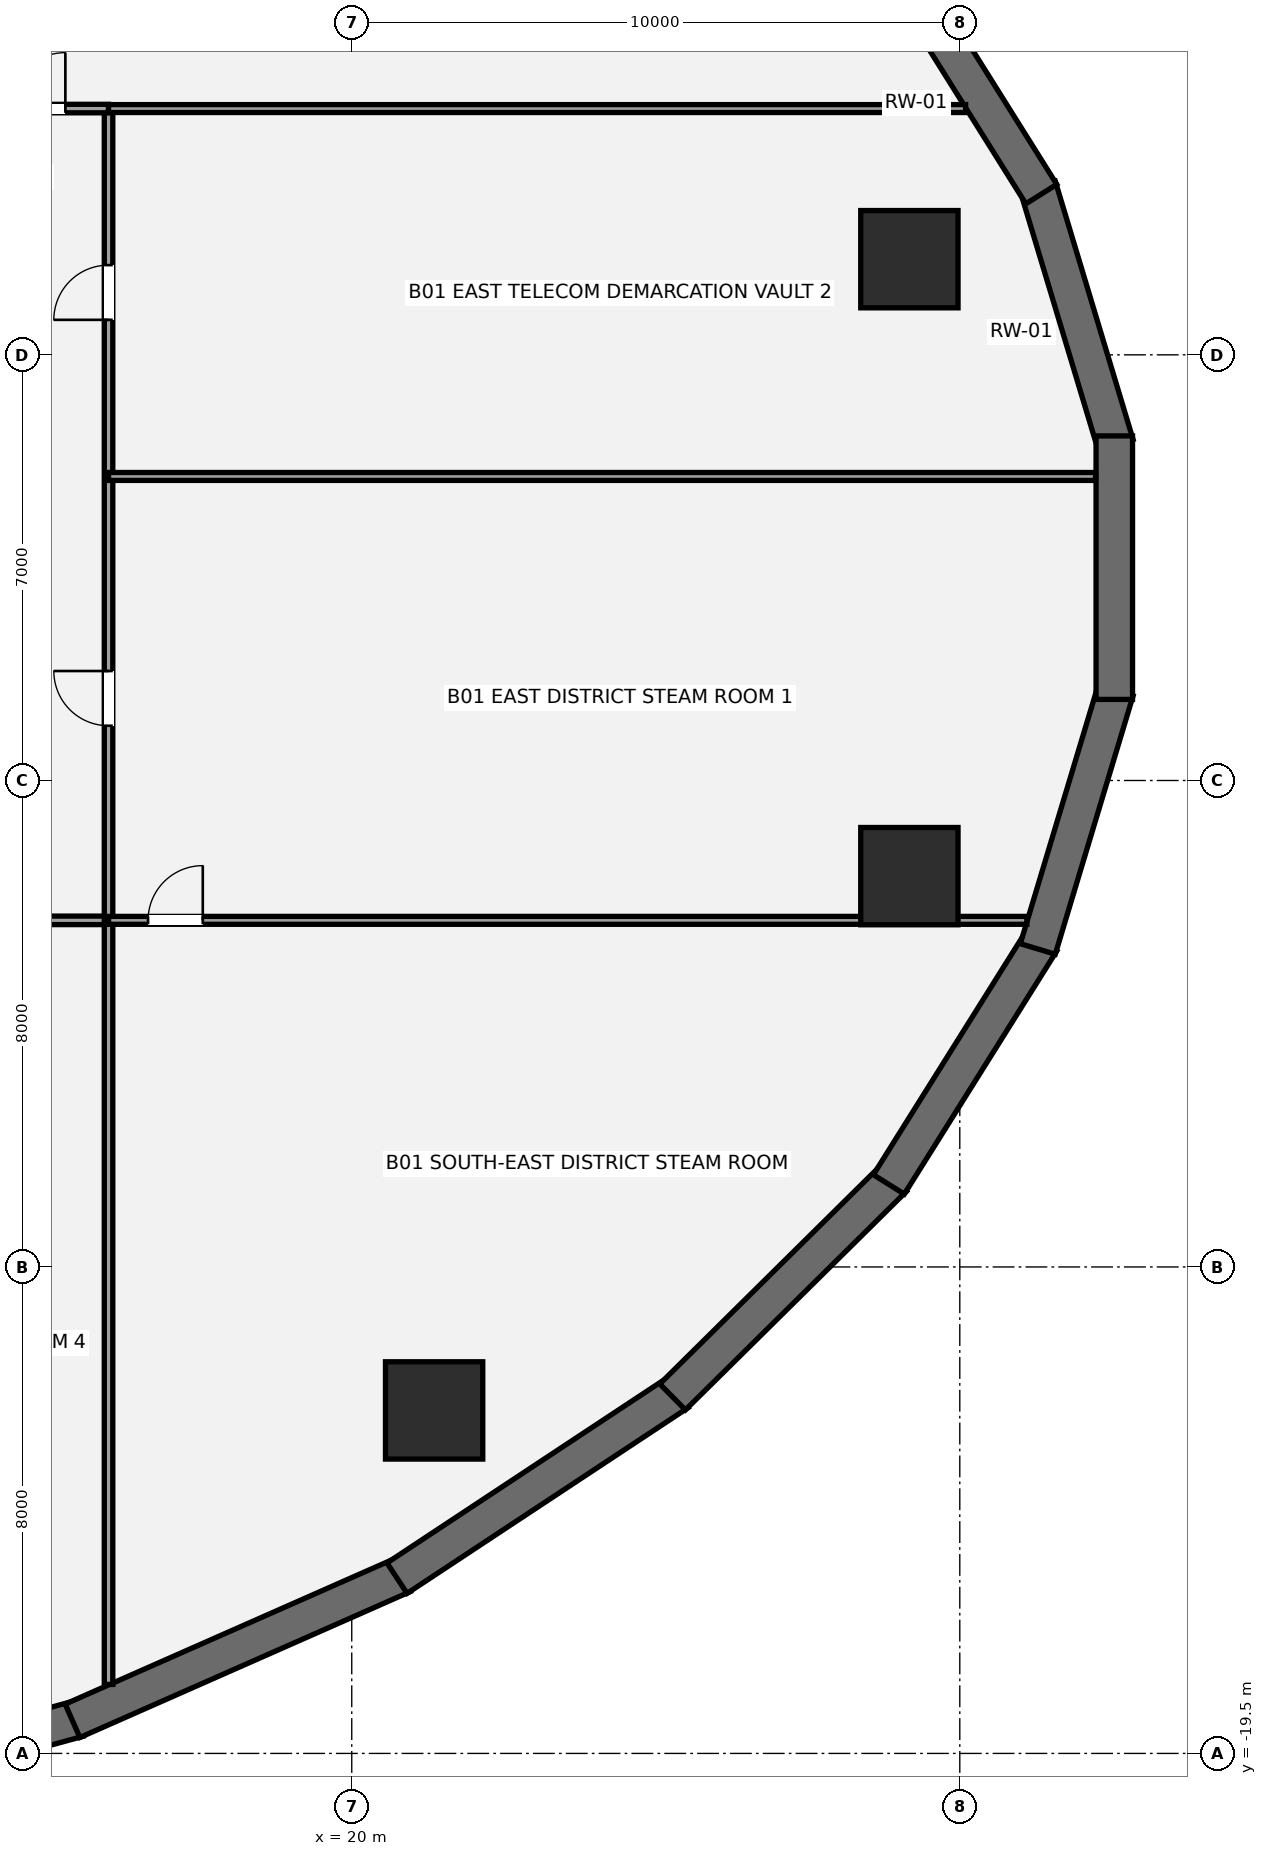
"""IFC4 building model, lengths in metres.
Left out: names, types, materials, properties, quantities, classifications, styles, units other than length and angle.
Written with IfcOpenShell. Run it as: python <this file> out.ifc"""

import sys

from ifc_helpers import new_model, si_unit, direction, frame, frame_2d, origin, origin_2d, place, context, subcontext, project, spatial, rectangle, hollow_circle, extrude, element, fill, save


model = new_model("IFC4")
c1 = context("Model", 3, precision=1e-05, world=origin(), true_north=direction((0.0, 1.0)))
c2 = subcontext(c1, "Body", "Model", "MODEL_VIEW")
j1 = project(units=[si_unit("LENGTHUNIT", "METRE"), si_unit("PLANEANGLEUNIT", "RADIAN")], contexts=[c1])
p1 = place(None, origin())
s1 = spatial("IfcSite", under=j1, at=p1, CompositionType="ELEMENT")
p2 = place(p1, origin())
s2 = spatial("IfcBuilding", under=s1, at=p2, CompositionType="ELEMENT")
p3 = place(p2, frame((0.0, 0.0, -4.4)))
s3 = spatial("IfcBuildingStorey", under=s2, at=p3, CompositionType="ELEMENT", Elevation=-4.4)
p4 = place(p3, frame((32.562, 2.021, 0.0), z_axis=(0.0, 0.0, 1.0), x_axis=(-0.288296686647, 0.95754113252, 0.0)))
e1 = element("IfcWall", 1, at=p4, inside=s3, PredefinedType="USERDEFINED", context=c2, shape_type="SweptSolid", body=[
    extrude(rectangle(XDim=4.438, YDim=0.6, at=frame_2d((2.219, 0.0))), origin(), (0.0, 0.0, 1.0), 4.4),
])
p5 = place(p3, frame((31.341, 6.143, 0.0), z_axis=(0.0, 0.0, 1.0), x_axis=(-0.531244363113, 0.847218641592, 0.0)))
e2 = element("IfcWall", 2, at=p5, inside=s3, PredefinedType="USERDEFINED", context=c2, shape_type="SweptSolid", body=[
    extrude(rectangle(XDim=4.72, YDim=0.6, at=frame_2d((2.36, 0.0))), origin(), (0.0, 0.0, 1.0), 4.4),
])
p6 = place(p3, frame((9.471, -20.58, 0.0), z_axis=(0.0, 0.0, 1.0), x_axis=(0.964548276597, 0.263906464707, 0.0)))
e3 = element("IfcWall", 3, at=p6, inside=s3, PredefinedType="USERDEFINED", context=c2, shape_type="SweptSolid", body=[
    extrude(rectangle(XDim=6.257, YDim=0.6, at=frame_2d((3.128, 0.0))), origin(), (0.0, 0.0, 1.0), 4.4),
])
p7 = place(p3, frame((15.407, -18.964, 0.0), z_axis=(0.0, 0.0, 1.0), x_axis=(0.91483072277, 0.403837527574, 0.0)))
e4 = element("IfcWall", 4, at=p7, inside=s3, PredefinedType="USERDEFINED", context=c2, shape_type="SweptSolid", body=[
    extrude(rectangle(XDim=5.94, YDim=0.6, at=frame_2d((2.97, 0.0))), origin(), (0.0, 0.0, 1.0), 4.4),
])
p8 = place(p3, frame((20.745, -16.618, 0.0), z_axis=(0.0, 0.0, 1.0), x_axis=(0.834367518908, 0.551208529861, 0.0)))
e5 = element("IfcWall", 5, at=p8, inside=s3, PredefinedType="USERDEFINED", context=c2, shape_type="SweptSolid", body=[
    extrude(rectangle(XDim=5.542, YDim=0.6, at=frame_2d((2.771, 0.0))), origin(), (0.0, 0.0, 1.0), 4.4),
])
p9 = place(p3, frame((25.277, -13.638, 0.0), z_axis=(0.0, 0.0, 1.0), x_axis=(0.711105403666, 0.70308541791, 0.0)))
e6 = element("IfcWall", 6, at=p9, inside=s3, PredefinedType="USERDEFINED", context=c2, shape_type="SweptSolid", body=[
    extrude(rectangle(XDim=5.114, YDim=0.6, at=frame_2d((2.557, 0.0))), origin(), (0.0, 0.0, 1.0), 4.4),
])
p10 = place(p3, frame((28.833, -10.142, 0.0), z_axis=(0.0, 0.0, 1.0), x_axis=(0.531244363113, 0.847218641592, 0.0)))
e7 = element("IfcWall", 7, at=p10, inside=s3, PredefinedType="USERDEFINED", context=c2, shape_type="SweptSolid", body=[
    extrude(rectangle(XDim=4.72, YDim=0.6, at=frame_2d((2.36, 0.0))), origin(), (0.0, 0.0, 1.0), 4.4),
])
p11 = place(p3, frame((31.283, -6.271, 0.0), z_axis=(0.0, 0.0, 1.0), x_axis=(0.288296686647, 0.95754113252, 0.0)))
e8 = element("IfcWall", 8, at=p11, inside=s3, PredefinedType="USERDEFINED", context=c2, shape_type="SweptSolid", body=[
    extrude(rectangle(XDim=4.438, YDim=0.6, at=frame_2d((2.219, 0.0))), origin(), (0.0, 0.0, 1.0), 4.4),
])
p12 = place(p3, frame((32.541, -2.167, 0.0), z_axis=(0.0, 0.0, 1.0), x_axis=(0.0, 1.0, 0.0)))
e9 = element("IfcWall", 9, at=p12, inside=s3, PredefinedType="USERDEFINED", context=c2, shape_type="SweptSolid", body=[
    extrude(rectangle(XDim=4.333, YDim=0.6, at=frame_2d((2.167, 0.0))), origin(), (0.0, 0.0, 1.0), 4.4),
])
for number, where, z_axis, x_axis in (
    (10, (29.171, 5.073, 0.0), (0.0, 0.0, 1.0), (1.0, 0.0, 0.0)),
    (11, (21.354, -13.859, 0.0), (0.0, 0.0, 1.0), (1.0, 0.0, 0.0)),
    (12, (29.171, -5.073, 0.0), (0.0, 0.0, 1.0), (1.0, 0.0, 0.0)),
):
    element("IfcColumn", number, at=place(p3, frame(where, z_axis=z_axis, x_axis=x_axis)), inside=s3, PredefinedType="USERDEFINED", context=c2, shape_type="SweptSolid", body=[
        extrude(hollow_circle(Radius=0.8, WallThickness=0.06, at=origin_2d()), origin(), (0.0, 0.0, 1.0), 4.4),
    ])
p13 = place(p3, frame((-16.0, -5.8, 0.0), z_axis=(0.0, 0.0, 1.0), x_axis=(1.0, 0.0, 0.0)))
e13 = element("IfcWall", 13, at=p13, inside=s3, PredefinedType="PARTITIONING", context=c2, shape_type="SweptSolid", body=[
    extrude(rectangle(XDim=32.0, YDim=0.14, at=frame_2d((16.0, 0.0))), origin(), (0.0, 0.0, 1.0), 4.14),
])
p14 = place(p13, frame((3.05, 0.0, 0.0)))
e14 = element("IfcOpeningElement", 14, at=p14, cuts=e13, PredefinedType="OPENING", context=c2, shape_type="SweptSolid", body=[
    extrude(rectangle(XDim=0.9, YDim=2.1, at=frame_2d((0.45, 1.05))), frame((0.0, 0.08, 0.0), z_axis=(0.0, -1.0, 0.0), x_axis=(1.0, 0.0, 0.0)), (0.0, 0.0, 1.0), 0.16),
])
p15 = place(p13, frame((11.05, 0.0, 0.0)))
e15 = element("IfcOpeningElement", 15, at=p15, cuts=e13, PredefinedType="OPENING", context=c2, shape_type="SweptSolid", body=[
    extrude(rectangle(XDim=0.9, YDim=2.1, at=frame_2d((0.45, 1.05))), frame((0.0, 0.08, 0.0), z_axis=(0.0, -1.0, 0.0), x_axis=(1.0, 0.0, 0.0)), (0.0, 0.0, 1.0), 0.16),
])
p16 = place(p13, frame((20.05, 0.0, 0.0)))
e16 = element("IfcOpeningElement", 16, at=p16, cuts=e13, PredefinedType="OPENING", context=c2, shape_type="SweptSolid", body=[
    extrude(rectangle(XDim=0.9, YDim=2.1, at=frame_2d((0.45, 1.05))), frame((0.0, 0.08, 0.0), z_axis=(0.0, -1.0, 0.0), x_axis=(1.0, 0.0, 0.0)), (0.0, 0.0, 1.0), 0.16),
])
p17 = place(p13, frame((28.05, 0.0, 0.0)))
e17 = element("IfcOpeningElement", 17, at=p17, cuts=e13, PredefinedType="OPENING", context=c2, shape_type="SweptSolid", body=[
    extrude(rectangle(XDim=0.9, YDim=2.1, at=frame_2d((0.45, 1.05))), frame((0.0, 0.08, 0.0), z_axis=(0.0, -1.0, 0.0), x_axis=(1.0, 0.0, 0.0)), (0.0, 0.0, 1.0), 0.16),
])
p18 = place(p3, frame((16.0, -18.365, 0.0), z_axis=(0.0, 0.0, 1.0), x_axis=(0.0, 1.0, 0.0)))
e18 = element("IfcWall", 18, at=p18, inside=s3, PredefinedType="PARTITIONING", context=c2, shape_type="SweptSolid", body=[
    extrude(rectangle(XDim=25.916, YDim=0.14, at=frame_2d((12.958, 0.0))), origin(), (0.0, 0.0, 1.0), 3.508),
])
p19 = place(p18, frame((15.766, 0.0, 0.0)))
e19 = element("IfcOpeningElement", 19, at=p19, cuts=e18, PredefinedType="OPENING", context=c2, shape_type="SweptSolid", body=[
    extrude(rectangle(XDim=0.9, YDim=2.1, at=frame_2d((0.45, 1.05))), frame((0.0, 0.08, 0.0), z_axis=(0.0, -1.0, 0.0), x_axis=(1.0, 0.0, 0.0)), (0.0, 0.0, 1.0), 0.16),
])
p20 = place(p18, frame((22.441, 0.0, 0.0)))
e20 = element("IfcOpeningElement", 20, at=p20, cuts=e18, PredefinedType="OPENING", context=c2, shape_type="SweptSolid", body=[
    extrude(rectangle(XDim=0.9, YDim=2.1, at=frame_2d((0.45, 1.05))), frame((0.0, 0.08, 0.0), z_axis=(0.0, -1.0, 0.0), x_axis=(1.0, 0.0, 0.0)), (0.0, 0.0, 1.0), 0.16),
])
p21 = place(p3, frame((14.05, 7.55, 0.0), z_axis=(0.0, 0.0, 1.0), x_axis=(1.0, 0.0, 0.0)))
e21 = element("IfcWall", 21, at=p21, inside=s3, PredefinedType="PARTITIONING", context=c2, shape_type="SweptSolid", body=[
    extrude(rectangle(XDim=1.95, YDim=0.14, at=frame_2d((0.975, 0.0))), origin(), (0.0, 0.0, 1.0), 4.14),
])
p22 = place(p21, frame((0.32, 0.0, 0.0)))
e22 = element("IfcOpeningElement", 22, at=p22, cuts=e21, PredefinedType="OPENING", context=c2, shape_type="SweptSolid", body=[
    extrude(rectangle(XDim=0.92, YDim=2.15, at=frame_2d((0.46, 1.075))), frame((0.0, 0.08, 0.0), z_axis=(0.0, -1.0, 0.0), x_axis=(1.0, 0.0, 0.0)), (0.0, 0.0, 1.0), 0.16),
])
p23 = place(p3, frame((16.0, 7.55, 0.0), z_axis=(0.0, 0.0, 1.0), x_axis=(1.0, 0.0, 0.0)))
e23 = element("IfcWall", 23, at=p23, inside=s3, PredefinedType="PARTITIONING", context=c2, shape_type="SweptSolid", body=[
    extrude(rectangle(XDim=14.095, YDim=0.13, at=frame_2d((7.048, 0.0))), origin(), (0.0, 0.0, 1.0), 3.118),
])
p24 = place(p3, frame((16.0, -5.8, 0.0), z_axis=(0.0, 0.0, 1.0), x_axis=(1.0, 0.0, 0.0)))
e24 = element("IfcWall", 24, at=p24, inside=s3, PredefinedType="PARTITIONING", context=c2, shape_type="SweptSolid", body=[
    extrude(rectangle(XDim=15.103, YDim=0.13, at=frame_2d((7.552, 0.0))), origin(), (0.0, 0.0, 1.0), 3.118),
])
p25 = place(p24, frame((0.65, 0.0, 0.0)))
e25 = element("IfcOpeningElement", 25, at=p25, cuts=e24, PredefinedType="OPENING", context=c2, shape_type="SweptSolid", body=[
    extrude(rectangle(XDim=0.9, YDim=2.1, at=frame_2d((0.45, 1.05))), frame((0.0, 0.075, 0.0), z_axis=(0.0, -1.0, 0.0), x_axis=(1.0, 0.0, 0.0)), (0.0, 0.0, 1.0), 0.15),
])
p26 = place(p3, frame((16.0, 1.5, 0.0), z_axis=(0.0, 0.0, 1.0), x_axis=(1.0, 0.0, 0.0)))
e26 = element("IfcWall", 26, at=p26, inside=s3, PredefinedType="PARTITIONING", context=c2, shape_type="SweptSolid", body=[
    extrude(rectangle(XDim=16.233, YDim=0.13, at=frame_2d((8.117, 0.0))), origin(), (0.0, 0.0, 1.0), 4.14),
])
p27 = place(p22, origin())
e27 = element("IfcDoor", 27, at=p27, inside=s3, OperationType="SINGLE_SWING_RIGHT", PredefinedType="DOOR", context=c2, shape_type="SweptSolid", body=[
    extrude(rectangle(XDim=0.92, YDim=2.15, at=frame_2d((0.46, 1.075))), frame((0.0, 0.025, 0.0), z_axis=(0.0, -1.0, 0.0), x_axis=(1.0, 0.0, 0.0)), (0.0, 0.0, 1.0), 0.05),
])
fill(e22, e27)
p28 = place(p25, origin())
e28 = element("IfcDoor", 28, at=p28, inside=s3, OperationType="SINGLE_SWING_RIGHT", PredefinedType="DOOR", context=c2, shape_type="SweptSolid", body=[
    extrude(rectangle(XDim=0.9, YDim=2.1, at=frame_2d((0.45, 1.05))), frame((0.0, 0.025, 0.0), z_axis=(0.0, -1.0, 0.0), x_axis=(1.0, 0.0, 0.0)), (0.0, 0.0, 1.0), 0.05),
])
fill(e25, e28)
p29 = place(p19, origin())
e29 = element("IfcDoor", 29, at=p29, inside=s3, OperationType="SINGLE_SWING_RIGHT", PredefinedType="DOOR", context=c2, shape_type="SweptSolid", body=[
    extrude(rectangle(XDim=0.9, YDim=2.1, at=frame_2d((0.45, 1.05))), frame((0.0, 0.025, 0.0), z_axis=(0.0, -1.0, 0.0), x_axis=(1.0, 0.0, 0.0)), (0.0, 0.0, 1.0), 0.05),
])
fill(e19, e29)
p30 = place(p20, origin())
e30 = element("IfcDoor", 30, at=p30, inside=s3, OperationType="SINGLE_SWING_LEFT", PredefinedType="DOOR", context=c2, shape_type="SweptSolid", body=[
    extrude(rectangle(XDim=0.9, YDim=2.1, at=frame_2d((0.45, 1.05))), frame((0.0, 0.025, 0.0), z_axis=(0.0, -1.0, 0.0), x_axis=(1.0, 0.0, 0.0)), (0.0, 0.0, 1.0), 0.05),
])
fill(e20, e30)
save(model, sys.argv[1])
